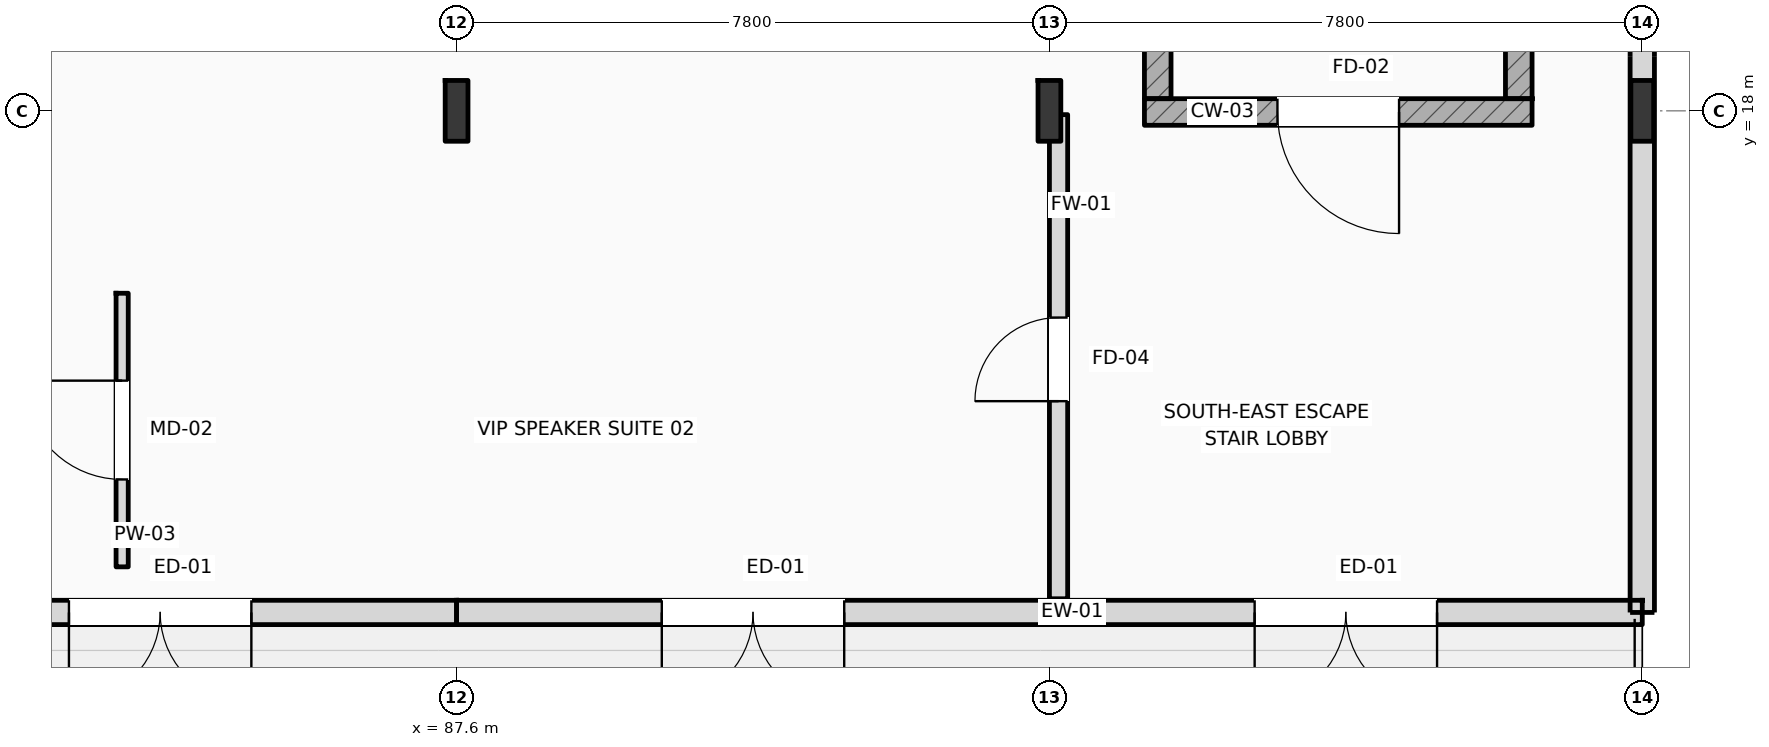
"""IFC4 building model, lengths in metres.
Left out: names, types, materials, properties, quantities, classifications, styles, units other than length and angle.
Written with IfcOpenShell. Run it as: python <this file> out.ifc"""

import sys

from ifc_helpers import new_model, si_unit, direction, frame, frame_2d, origin, origin_2d, place, context, subcontext, project, spatial, rectangle, i_section, extrude, element, fill, save


model = new_model("IFC4")
c1 = context("Model", 3, precision=1e-05, world=origin(), true_north=direction((0.0, 1.0)))
c2 = subcontext(c1, "Body", "Model", "MODEL_VIEW")
j1 = project(units=[si_unit("LENGTHUNIT", "METRE"), si_unit("PLANEANGLEUNIT", "RADIAN")], contexts=[c1])
p1 = place(None, origin())
s1 = spatial("IfcSite", under=j1, at=p1, CompositionType="ELEMENT")
p2 = place(p1, origin())
s2 = spatial("IfcBuilding", under=s1, at=p2, CompositionType="ELEMENT")
p3 = place(p2, origin())
s3 = spatial("IfcBuildingStorey", under=s2, at=p3, CompositionType="ELEMENT", Elevation=0.0)
for number, where, z_axis, x_axis in (
    (1, (87.6, 18.0, 0.0), (0.0, 0.0, 1.0), (1.0, 0.0, 0.0)),
    (2, (95.4, 18.0, 0.0), (0.0, 0.0, 1.0), (1.0, 0.0, 0.0)),
    (3, (103.2, 18.0, 0.0), (0.0, 0.0, 1.0), (1.0, 0.0, 0.0)),
):
    element("IfcColumn", number, at=place(p3, frame(where, z_axis=z_axis, x_axis=x_axis)), inside=s3, PredefinedType="COLUMN", context=c2, shape_type="SweptSolid", body=[
        extrude(i_section(OverallWidth=0.3, OverallDepth=0.8, WebThickness=0.018, FlangeThickness=0.033, FilletRadius=0.03, at=origin_2d()), origin(), (0.0, 0.0, 1.0), 6.0),
    ])
p4 = place(p3, frame((96.65, 17.985, 0.0), z_axis=(0.0, 0.0, 1.0), x_axis=(1.0, 0.0, 0.0)))
e4 = element("IfcWall", 4, at=p4, inside=s3, PredefinedType="SHEAR", context=c2, shape_type="SweptSolid", body=[
    extrude(rectangle(XDim=5.1, YDim=0.35, at=frame_2d((2.55, 0.0))), origin(), (0.0, 0.0, 1.0), 6.0),
])
p5 = place(p4, frame((1.75, 0.0, 0.0)))
e5 = element("IfcOpeningElement", 5, at=p5, cuts=e4, PredefinedType="OPENING", context=c2, shape_type="SweptSolid", body=[
    extrude(rectangle(XDim=1.6, YDim=2.2, at=frame_2d((0.8, 1.1))), frame((0.0, 0.185, 0.0), z_axis=(0.0, -1.0, 0.0), x_axis=(1.0, 0.0, 0.0)), (0.0, 0.0, 1.0), 0.37),
])
for number, where, z_axis, x_axis in (
    (6, (96.825, 18.16, 0.0), (0.0, 0.0, 1.0), (0.0, 1.0, 0.0)),
    (7, (101.575, 18.16, 0.0), (0.0, 0.0, 1.0), (0.0, 1.0, 0.0)),
):
    element("IfcWall", number, at=place(p3, frame(where, z_axis=z_axis, x_axis=x_axis)), inside=s3, PredefinedType="SHEAR", context=c2, shape_type="SweptSolid", body=[
        extrude(rectangle(XDim=8.68, YDim=0.35, at=frame_2d((4.34, 0.0))), origin(), (0.0, 0.0, 1.0), 6.0),
    ])
p6 = place(p3, frame((79.8, 11.4, 0.0), z_axis=(0.0, 0.0, 1.0), x_axis=(1.0, 0.0, 0.0)))
e8 = element("IfcWall", 8, at=p6, inside=s3, PredefinedType="STANDARD", context=c2, shape_type="SweptSolid", body=[
    extrude(rectangle(XDim=7.8, YDim=0.32, at=frame_2d((3.9, 0.0))), origin(), (0.0, 0.0, 1.0), 5.7),
])
p7 = place(p6, frame((2.7, 0.0, 0.0)))
e9 = element("IfcOpeningElement", 9, at=p7, cuts=e8, PredefinedType="OPENING", context=c2, shape_type="SweptSolid", body=[
    extrude(rectangle(XDim=2.4, YDim=2.6, at=frame_2d((1.2, 1.3))), frame((0.0, 0.17, 0.0), z_axis=(0.0, -1.0, 0.0), x_axis=(1.0, 0.0, 0.0)), (0.0, 0.0, 1.0), 0.34),
])
p8 = place(p3, frame((87.6, 11.4, 0.0), z_axis=(0.0, 0.0, 1.0), x_axis=(1.0, 0.0, 0.0)))
e10 = element("IfcWall", 10, at=p8, inside=s3, PredefinedType="STANDARD", context=c2, shape_type="SweptSolid", body=[
    extrude(rectangle(XDim=7.8, YDim=0.32, at=frame_2d((3.9, 0.0))), origin(), (0.0, 0.0, 1.0), 5.7),
])
p9 = place(p8, frame((2.7, 0.0, 0.0)))
e11 = element("IfcOpeningElement", 11, at=p9, cuts=e10, PredefinedType="OPENING", context=c2, shape_type="SweptSolid", body=[
    extrude(rectangle(XDim=2.4, YDim=2.6, at=frame_2d((1.2, 1.3))), frame((0.0, 0.17, 0.0), z_axis=(0.0, -1.0, 0.0), x_axis=(1.0, 0.0, 0.0)), (0.0, 0.0, 1.0), 0.34),
])
p10 = place(p3, frame((95.4, 11.4, 0.0), z_axis=(0.0, 0.0, 1.0), x_axis=(1.0, 0.0, 0.0)))
e12 = element("IfcWall", 12, at=p10, inside=s3, PredefinedType="STANDARD", context=c2, shape_type="SweptSolid", body=[
    extrude(rectangle(XDim=7.8, YDim=0.32, at=frame_2d((3.9, 0.0))), origin(), (0.0, 0.0, 1.0), 5.7),
])
p11 = place(p10, frame((2.7, 0.0, 0.0)))
e13 = element("IfcOpeningElement", 13, at=p11, cuts=e12, PredefinedType="OPENING", context=c2, shape_type="SweptSolid", body=[
    extrude(rectangle(XDim=2.4, YDim=2.6, at=frame_2d((1.2, 1.3))), frame((0.0, 0.17, 0.0), z_axis=(0.0, -1.0, 0.0), x_axis=(1.0, 0.0, 0.0)), (0.0, 0.0, 1.0), 0.34),
])
p12 = place(p3, frame((103.2, 11.4, 0.0), z_axis=(0.0, 0.0, 1.0), x_axis=(0.0, 1.0, 0.0)))
e14 = element("IfcWall", 14, at=p12, inside=s3, PredefinedType="STANDARD", context=c2, shape_type="SweptSolid", body=[
    extrude(rectangle(XDim=42.55, YDim=0.32, at=frame_2d((21.275, 0.0))), origin(), (0.0, 0.0, 1.0), 5.2),
])
p13 = place(p12, frame((30.2, 0.0, 0.0)))
e15 = element("IfcOpeningElement", 15, at=p13, cuts=e14, PredefinedType="OPENING", context=c2, shape_type="SweptSolid", body=[
    extrude(rectangle(XDim=1.6, YDim=2.3, at=frame_2d((0.8, 1.15))), frame((0.0, 0.17, 0.0), z_axis=(0.0, -1.0, 0.0), x_axis=(1.0, 0.0, 0.0)), (0.0, 0.0, 1.0), 0.34),
])
p14 = place(p3, frame((83.2, 12.0, 0.0), z_axis=(0.0, 0.0, 1.0), x_axis=(0.0, 1.0, 0.0)))
e16 = element("IfcWall", 16, at=p14, inside=s3, PredefinedType="PARTITIONING", context=c2, shape_type="SweptSolid", body=[
    extrude(rectangle(XDim=3.6, YDim=0.16, at=frame_2d((1.8, 0.0))), origin(), (0.0, 0.0, 1.0), 5.7),
])
p15 = place(p14, frame((1.15, 0.0, 0.0)))
e17 = element("IfcOpeningElement", 17, at=p15, cuts=e16, PredefinedType="OPENING", context=c2, shape_type="SweptSolid", body=[
    extrude(rectangle(XDim=1.3, YDim=2.2, at=frame_2d((0.65, 1.1))), frame((0.0, 0.09, 0.0), z_axis=(0.0, -1.0, 0.0), x_axis=(1.0, 0.0, 0.0)), (0.0, 0.0, 1.0), 0.18),
])
p16 = place(p3, frame((95.52, 11.58, 0.0), z_axis=(0.0, 0.0, 1.0), x_axis=(0.0, 1.0, 0.0)))
e18 = element("IfcWall", 18, at=p16, inside=s3, PredefinedType="STANDARD", context=c2, shape_type="SweptSolid", body=[
    extrude(rectangle(XDim=6.37, YDim=0.24, at=frame_2d((3.185, 0.0))), origin(), (0.0, 0.0, 1.0), 5.2),
])
p17 = place(p16, frame((2.6, 0.0, 0.0)))
e19 = element("IfcOpeningElement", 19, at=p17, cuts=e18, PredefinedType="OPENING", context=c2, shape_type="SweptSolid", body=[
    extrude(rectangle(XDim=1.1, YDim=2.2, at=frame_2d((0.55, 1.1))), frame((0.0, 0.13, 0.0), z_axis=(0.0, -1.0, 0.0), x_axis=(1.0, 0.0, 0.0)), (0.0, 0.0, 1.0), 0.26),
])
p18 = place(p7, frame((2.4, 0.0, 0.0), z_axis=(0.0, 0.0, 1.0), x_axis=(-1.0, 0.0, 0.0)))
e20 = element("IfcDoor", 20, at=p18, inside=s3, OperationType="DOUBLE_SWING_LEFT", PredefinedType="DOOR", context=c2, shape_type="SweptSolid", body=[
    extrude(rectangle(XDim=2.4, YDim=2.6, at=frame_2d((1.2, 1.3))), frame((0.0, 0.025, 0.0), z_axis=(0.0, -1.0, 0.0), x_axis=(1.0, 0.0, 0.0)), (0.0, 0.0, 1.0), 0.05),
])
fill(e9, e20)
p19 = place(p9, frame((2.4, 0.0, 0.0), z_axis=(0.0, 0.0, 1.0), x_axis=(-1.0, 0.0, 0.0)))
e21 = element("IfcDoor", 21, at=p19, inside=s3, OperationType="DOUBLE_SWING_LEFT", PredefinedType="DOOR", context=c2, shape_type="SweptSolid", body=[
    extrude(rectangle(XDim=2.4, YDim=2.6, at=frame_2d((1.2, 1.3))), frame((0.0, 0.025, 0.0), z_axis=(0.0, -1.0, 0.0), x_axis=(1.0, 0.0, 0.0)), (0.0, 0.0, 1.0), 0.05),
])
fill(e11, e21)
p20 = place(p11, frame((2.4, 0.0, 0.0), z_axis=(0.0, 0.0, 1.0), x_axis=(-1.0, 0.0, 0.0)))
e22 = element("IfcDoor", 22, at=p20, inside=s3, OperationType="DOUBLE_SWING_LEFT", PredefinedType="DOOR", context=c2, shape_type="SweptSolid", body=[
    extrude(rectangle(XDim=2.4, YDim=2.6, at=frame_2d((1.2, 1.3))), frame((0.0, 0.025, 0.0), z_axis=(0.0, -1.0, 0.0), x_axis=(1.0, 0.0, 0.0)), (0.0, 0.0, 1.0), 0.05),
])
fill(e13, e22)
p21 = place(p5, frame((1.6, 0.0, 0.0), z_axis=(0.0, 0.0, 1.0), x_axis=(-1.0, 0.0, 0.0)))
e23 = element("IfcDoor", 23, at=p21, inside=s3, OperationType="SINGLE_SWING_RIGHT", PredefinedType="DOOR", context=c2, shape_type="SweptSolid", body=[
    extrude(rectangle(XDim=1.6, YDim=2.2, at=frame_2d((0.8, 1.1))), frame((0.0, 0.025, 0.0), z_axis=(0.0, -1.0, 0.0), x_axis=(1.0, 0.0, 0.0)), (0.0, 0.0, 1.0), 0.05),
])
fill(e5, e23)
p22 = place(p15, origin())
e24 = element("IfcDoor", 24, at=p22, inside=s3, OperationType="SINGLE_SWING_RIGHT", PredefinedType="DOOR", context=c2, shape_type="SweptSolid", body=[
    extrude(rectangle(XDim=1.3, YDim=2.2, at=frame_2d((0.65, 1.1))), frame((0.0, 0.025, 0.0), z_axis=(0.0, -1.0, 0.0), x_axis=(1.0, 0.0, 0.0)), (0.0, 0.0, 1.0), 0.05),
])
fill(e17, e24)
p23 = place(p17, origin())
e25 = element("IfcDoor", 25, at=p23, inside=s3, OperationType="SINGLE_SWING_LEFT", PredefinedType="DOOR", context=c2, shape_type="SweptSolid", body=[
    extrude(rectangle(XDim=1.1, YDim=2.2, at=frame_2d((0.55, 1.1))), frame((0.0, 0.025, 0.0), z_axis=(0.0, -1.0, 0.0), x_axis=(1.0, 0.0, 0.0)), (0.0, 0.0, 1.0), 0.05),
])
fill(e19, e25)
save(model, sys.argv[1])
